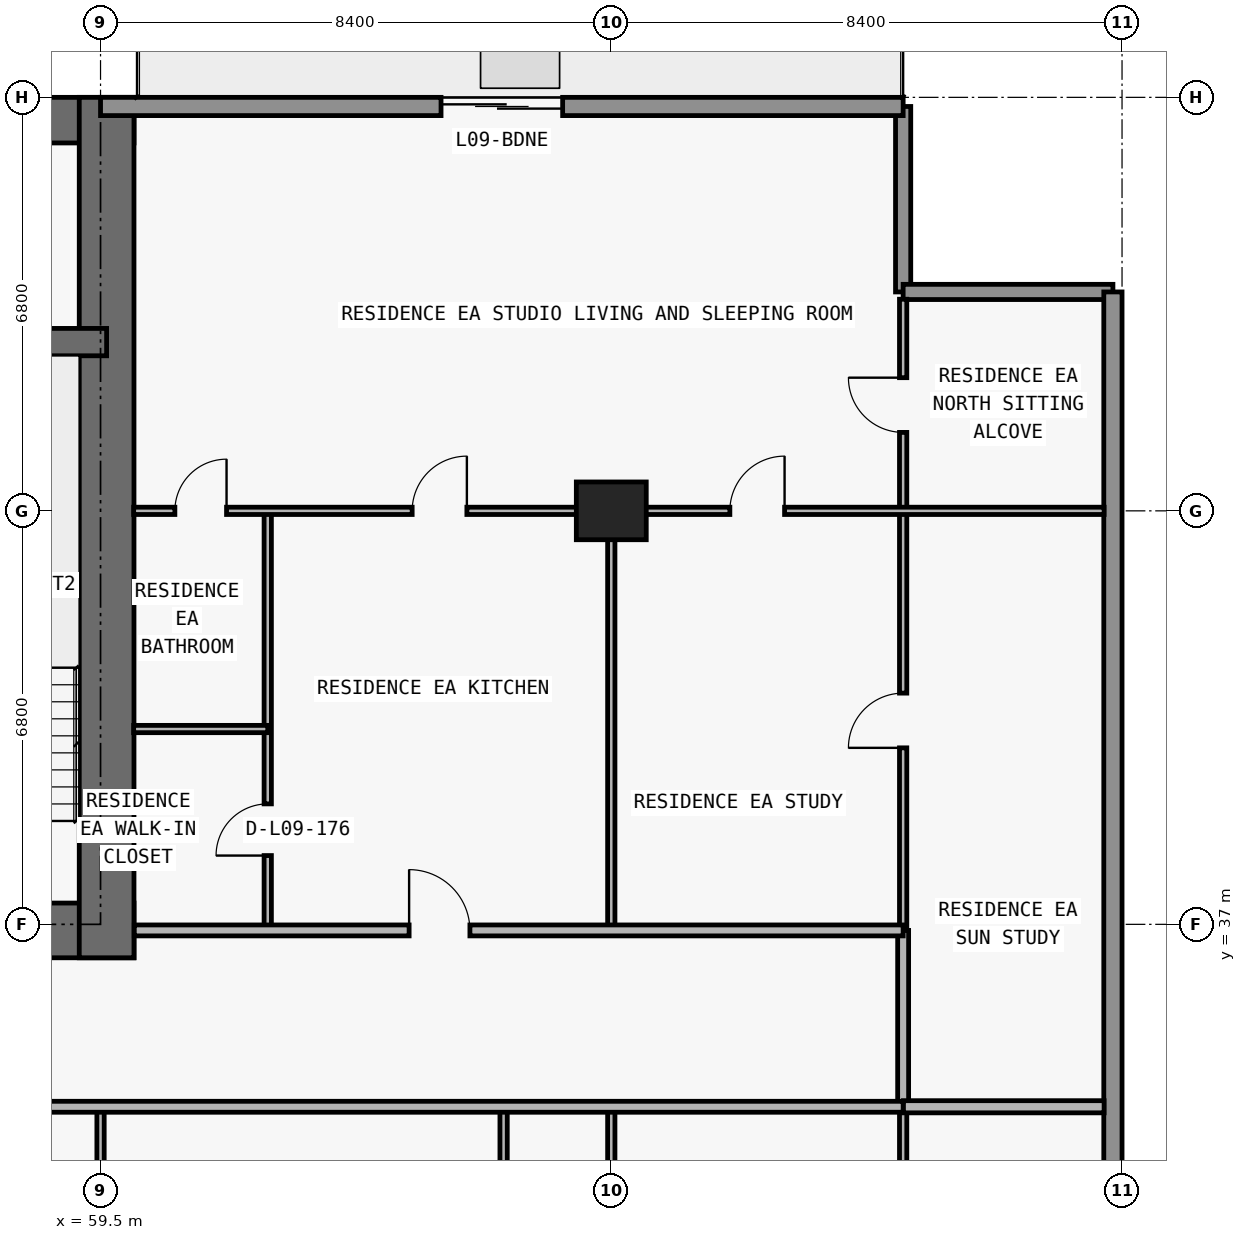
"""IFC4 building model, lengths in metres.
Left out: names, types, materials, properties, quantities, classifications, styles, units other than length and angle.
Written with IfcOpenShell. Run it as: python <this file> out.ifc"""

import sys

from ifc_helpers import new_model, si_unit, direction, frame, frame_2d, origin, origin_2d, place, context, subcontext, project, spatial, rectangle, extrude, element, fill, save


model = new_model("IFC4")
c1 = context("Model", 3, precision=1e-05, world=origin(), true_north=direction((0.0, 1.0)))
c2 = subcontext(c1, "Body", "Model", "MODEL_VIEW")
j1 = project(units=[si_unit("LENGTHUNIT", "METRE"), si_unit("PLANEANGLEUNIT", "RADIAN")], contexts=[c1])
p1 = place(None, origin())
s1 = spatial("IfcSite", under=j1, at=p1, CompositionType="ELEMENT")
p2 = place(p1, origin())
s2 = spatial("IfcBuilding", under=s1, at=p2, CompositionType="ELEMENT")
p3 = place(p2, frame((0.0, 0.0, 39.9)))
s3 = spatial("IfcBuildingStorey", under=s2, at=p3, CompositionType="ELEMENT", Elevation=39.9)
p4 = place(p3, frame((67.9, 43.8, 0.0), z_axis=(0.0, 0.0, 1.0), x_axis=(1.0, 0.0, 0.0)))
e1 = element("IfcColumn", 1, at=p4, inside=s3, PredefinedType="COLUMN", context=c2, shape_type="SweptSolid", body=[
    extrude(rectangle(XDim=1.15, YDim=0.95, at=origin_2d()), origin(), (0.0, 0.0, 1.0), 3.05),
])
p5 = place(p3, frame((17.75, 36.9, 0.0), z_axis=(0.0, 0.0, 1.0), x_axis=(1.0, 0.0, 0.0)))
e2 = element("IfcWall", 2, at=p5, inside=s3, PredefinedType="SHEAR", context=c2, shape_type="SweptSolid", body=[
    extrude(rectangle(XDim=42.3, YDim=0.9, at=frame_2d((21.15, 0.0))), origin(), (0.0, 0.0, 1.0), 3.05),
])
p6 = place(p5, frame((14.55, 0.0, 0.0)))
e3 = element("IfcOpeningElement", 3, at=p6, cuts=e2, PredefinedType="OPENING", context=c2, shape_type="SweptSolid", body=[
    extrude(rectangle(XDim=1.1, YDim=2.15, at=frame_2d((0.55, 1.075))), frame((0.0, 0.46, 0.0), z_axis=(0.0, -1.0, 0.0), x_axis=(1.0, 0.0, 0.0)), (0.0, 0.0, 1.0), 0.92),
])
p7 = place(p5, frame((6.4, 0.0, 0.0)))
e4 = element("IfcOpeningElement", 4, at=p7, cuts=e2, PredefinedType="OPENING", context=c2, shape_type="SweptSolid", body=[
    extrude(rectangle(XDim=1.05, YDim=2.15, at=frame_2d((0.525, 1.075))), frame((0.0, 0.46, 0.0), z_axis=(0.0, -1.0, 0.0), x_axis=(1.0, 0.0, 0.0)), (0.0, 0.0, 1.0), 0.92),
])
p8 = place(p5, frame((34.9, 0.0, 0.0)))
e5 = element("IfcOpeningElement", 5, at=p8, cuts=e2, PredefinedType="OPENING", context=c2, shape_type="SweptSolid", body=[
    extrude(rectangle(XDim=1.05, YDim=2.15, at=frame_2d((0.525, 1.075))), frame((0.0, 0.46, 0.0), z_axis=(0.0, -1.0, 0.0), x_axis=(1.0, 0.0, 0.0)), (0.0, 0.0, 1.0), 0.92),
])
p9 = place(p5, frame((11.012, 0.0, 0.0)))
e6 = element("IfcOpeningElement", 6, at=p9, cuts=e2, PredefinedType="OPENING", context=c2, shape_type="SweptSolid", body=[
    extrude(rectangle(XDim=1.05, YDim=2.15, at=frame_2d((0.525, 1.075))), frame((0.0, 0.46, 0.0), z_axis=(0.0, -1.0, 0.0), x_axis=(1.0, 0.0, 0.0)), (0.0, 0.0, 1.0), 0.92),
])
p10 = place(p5, frame((24.25, 0.0, 0.0)))
e7 = element("IfcOpeningElement", 7, at=p10, cuts=e2, PredefinedType="OPENING", context=c2, shape_type="SweptSolid", body=[
    extrude(rectangle(XDim=1.05, YDim=2.15, at=frame_2d((0.525, 1.075))), frame((0.0, 0.46, 0.0), z_axis=(0.0, -1.0, 0.0), x_axis=(1.0, 0.0, 0.0)), (0.0, 0.0, 1.0), 0.92),
])
p11 = place(p3, frame((17.75, 50.225, 0.0), z_axis=(0.0, 0.0, 1.0), x_axis=(1.0, 0.0, 0.0)))
e8 = element("IfcWall", 8, at=p11, inside=s3, PredefinedType="SHEAR", context=c2, shape_type="SweptSolid", body=[
    extrude(rectangle(XDim=42.3, YDim=0.75, at=frame_2d((21.15, 0.0))), origin(), (0.0, 0.0, 1.0), 3.05),
])
p12 = place(p3, frame((59.6, 36.45, 0.0), z_axis=(0.0, 0.0, 1.0), x_axis=(0.0, 1.0, 0.0)))
e9 = element("IfcWall", 9, at=p12, inside=s3, PredefinedType="SHEAR", context=c2, shape_type="SweptSolid", body=[
    extrude(rectangle(XDim=14.15, YDim=0.9, at=frame_2d((7.075, 0.0))), origin(), (0.0, 0.0, 1.0), 3.05),
])
p13 = place(p3, frame((18.2, 46.575, 0.0), z_axis=(0.0, 0.0, 1.0), x_axis=(1.0, 0.0, 0.0)))
e10 = element("IfcWall", 10, at=p13, inside=s3, PredefinedType="SHEAR", context=c2, shape_type="SweptSolid", body=[
    extrude(rectangle(XDim=41.4, YDim=0.45, at=frame_2d((20.7, 0.0))), origin(), (0.0, 0.0, 1.0), 3.05),
])
p14 = place(p13, frame((7.7, 0.0, 0.0)))
e11 = element("IfcOpeningElement", 11, at=p14, cuts=e10, PredefinedType="OPENING", context=c2, shape_type="SweptSolid", body=[
    extrude(rectangle(XDim=1.0, YDim=2.2, at=frame_2d((0.5, 1.1))), frame((0.0, 0.235, 0.0), z_axis=(0.0, -1.0, 0.0), x_axis=(1.0, 0.0, 0.0)), (0.0, 0.0, 1.0), 0.47),
])
p15 = place(p13, frame((32.725, 0.0, 0.0)))
e12 = element("IfcOpeningElement", 12, at=p15, cuts=e10, PredefinedType="OPENING", context=c2, shape_type="SweptSolid", body=[
    extrude(rectangle(XDim=1.05, YDim=2.15, at=frame_2d((0.525, 1.075))), frame((0.0, 0.235, 0.0), z_axis=(0.0, -1.0, 0.0), x_axis=(1.0, 0.0, 0.0)), (0.0, 0.0, 1.0), 0.47),
])
p16 = place(p3, frame((72.7, 50.45, 0.0), z_axis=(0.0, 0.0, 1.0), x_axis=(0.0, -1.0, 0.0)))
e13 = element("IfcWall", 13, at=p16, inside=s3, PredefinedType="ELEMENTEDWALL", context=c2, shape_type="SweptSolid", body=[
    extrude(rectangle(XDim=3.05, YDim=0.25, at=frame_2d((1.525, 0.0))), origin(), (0.0, 0.0, 1.0), 3.05),
])
p17 = place(p3, frame((72.7, 47.4, 0.0), z_axis=(0.0, 0.0, 1.0), x_axis=(1.0, 0.0, 0.0)))
e14 = element("IfcWall", 14, at=p17, inside=s3, PredefinedType="ELEMENTEDWALL", context=c2, shape_type="SweptSolid", body=[
    extrude(rectangle(XDim=3.45, YDim=0.25, at=frame_2d((1.725, 0.0))), origin(), (0.0, 0.0, 1.0), 3.05),
])
p18 = place(p3, frame((76.15, 47.4, 0.0), z_axis=(0.0, 0.0, 1.0), x_axis=(0.0, -1.0, 0.0)))
e15 = element("IfcWall", 15, at=p18, inside=s3, PredefinedType="STANDARD", context=c2, shape_type="SweptSolid", body=[
    extrude(rectangle(XDim=20.6, YDim=0.3, at=frame_2d((10.3, 0.0))), origin(), (0.0, 0.0, 1.0), 3.05),
])
p19 = place(p3, frame((59.5, 50.45, 0.0), z_axis=(0.0, 0.0, 1.0), x_axis=(1.0, 0.0, 0.0)))
e16 = element("IfcWall", 16, at=p19, inside=s3, PredefinedType="STANDARD", context=c2, shape_type="SweptSolid", body=[
    extrude(rectangle(XDim=13.2, YDim=0.3, at=frame_2d((6.6, 0.0))), origin(), (0.0, 0.0, 1.0), 3.05),
])
p20 = place(p19, frame((5.6, 0.0, 0.0)))
e17 = element("IfcOpeningElement", 17, at=p20, cuts=e16, PredefinedType="OPENING", context=c2, shape_type="SweptSolid", body=[
    extrude(rectangle(XDim=2.0, YDim=2.3, at=frame_2d((1.0, 1.15))), frame((0.0, 0.16, 0.0), z_axis=(0.0, -1.0, 0.0), x_axis=(1.0, 0.0, 0.0)), (0.0, 0.0, 1.0), 0.32),
])
p21 = place(p3, frame((59.5, 28.84, 0.0), z_axis=(0.0, 0.0, 1.0), x_axis=(0.0, 1.0, 0.0)))
e18 = element("IfcWall", 18, at=p21, inside=s3, PredefinedType="PARTITIONING", context=c2, shape_type="SweptSolid", body=[
    extrude(rectangle(XDim=5.16, YDim=0.12, at=frame_2d((2.58, 0.0))), origin(), (0.0, 0.0, 1.0), 2.11),
])
p22 = place(p3, frame((62.25, 36.9, 0.0), z_axis=(0.0, 0.0, 1.0), x_axis=(0.0, 1.0, 0.0)))
e19 = element("IfcWall", 19, at=p22, inside=s3, PredefinedType="PARTITIONING", context=c2, shape_type="SweptSolid", body=[
    extrude(rectangle(XDim=6.9, YDim=0.12, at=frame_2d((3.45, 0.0))), origin(), (0.0, 0.0, 1.0), 3.05),
])
p23 = place(p22, frame((1.231, 0.0, 0.0)))
e20 = element("IfcOpeningElement", 20, at=p23, cuts=e19, PredefinedType="OPENING", context=c2, shape_type="SweptSolid", body=[
    extrude(rectangle(XDim=0.85, YDim=2.1, at=frame_2d((0.425, 1.05))), frame((0.0, 0.07, 0.0), z_axis=(0.0, -1.0, 0.0), x_axis=(1.0, 0.0, 0.0)), (0.0, 0.0, 1.0), 0.14),
])
p24 = place(p3, frame((66.129, 28.84, 0.0), z_axis=(0.0, 0.0, 1.0), x_axis=(0.0, 1.0, 0.0)))
e21 = element("IfcWall", 21, at=p24, inside=s3, PredefinedType="PARTITIONING", context=c2, shape_type="SweptSolid", body=[
    extrude(rectangle(XDim=5.16, YDim=0.12, at=frame_2d((2.58, 0.0))), origin(), (0.0, 0.0, 1.0), 3.05),
])
p25 = place(p24, frame((2.155, 0.0, 0.0)))
e22 = element("IfcOpeningElement", 22, at=p25, cuts=e21, PredefinedType="OPENING", context=c2, shape_type="SweptSolid", body=[
    extrude(rectangle(XDim=0.85, YDim=2.1, at=frame_2d((0.425, 1.05))), frame((0.0, 0.07, 0.0), z_axis=(0.0, -1.0, 0.0), x_axis=(1.0, 0.0, 0.0)), (0.0, 0.0, 1.0), 0.14),
])
p26 = place(p3, frame((67.9, 28.84, 0.0), z_axis=(0.0, 0.0, 1.0), x_axis=(0.0, 1.0, 0.0)))
e23 = element("IfcWall", 23, at=p26, inside=s3, PredefinedType="PARTITIONING", context=c2, shape_type="SweptSolid", body=[
    extrude(rectangle(XDim=5.16, YDim=0.12, at=frame_2d((2.58, 0.0))), origin(), (0.0, 0.0, 1.0), 2.11),
])
p27 = place(p3, frame((67.9, 36.9, 0.0), z_axis=(0.0, 0.0, 1.0), x_axis=(0.0, 1.0, 0.0)))
e24 = element("IfcWall", 24, at=p27, inside=s3, PredefinedType="PARTITIONING", context=c2, shape_type="SweptSolid", body=[
    extrude(rectangle(XDim=6.9, YDim=0.12, at=frame_2d((3.45, 0.0))), origin(), (0.0, 0.0, 1.0), 2.11),
])
p28 = place(p3, frame((72.7, 28.84, 0.0), z_axis=(0.0, 0.0, 1.0), x_axis=(0.0, 1.0, 0.0)))
e25 = element("IfcWall", 25, at=p28, inside=s3, PredefinedType="PARTITIONING", context=c2, shape_type="SweptSolid", body=[
    extrude(rectangle(XDim=5.16, YDim=0.12, at=frame_2d((2.58, 0.0))), origin(), (0.0, 0.0, 1.0), 3.05),
])
p29 = place(p3, frame((72.7, 34.005, 0.0), z_axis=(0.0, 0.0, 1.0), x_axis=(0.0, 1.0, 0.0)))
e26 = element("IfcWall", 26, at=p29, inside=s3, PredefinedType="PARTITIONING", context=c2, shape_type="SweptSolid", body=[
    extrude(rectangle(XDim=2.895, YDim=0.18, at=frame_2d((1.448, 0.0))), origin(), (0.0, 0.0, 1.0), 3.05),
])
p30 = place(p3, frame((72.7, 36.905, 0.0), z_axis=(0.0, 0.0, 1.0), x_axis=(0.0, 1.0, 0.0)))
e27 = element("IfcWall", 27, at=p30, inside=s3, PredefinedType="PARTITIONING", context=c2, shape_type="SweptSolid", body=[
    extrude(rectangle(XDim=10.375, YDim=0.12, at=frame_2d((5.188, 0.0))), origin(), (0.0, 0.0, 1.0), 3.05),
])
p31 = place(p30, frame((2.998, 0.0, 0.0)))
e28 = element("IfcOpeningElement", 28, at=p31, cuts=e27, PredefinedType="OPENING", context=c2, shape_type="SweptSolid", body=[
    extrude(rectangle(XDim=0.9, YDim=2.15, at=frame_2d((0.45, 1.075))), frame((0.0, 0.07, 0.0), z_axis=(0.0, -1.0, 0.0), x_axis=(1.0, 0.0, 0.0)), (0.0, 0.0, 1.0), 0.14),
])
p32 = place(p30, frame((8.185, 0.0, 0.0)))
e29 = element("IfcOpeningElement", 29, at=p32, cuts=e27, PredefinedType="OPENING", context=c2, shape_type="SweptSolid", body=[
    extrude(rectangle(XDim=0.9, YDim=2.15, at=frame_2d((0.45, 1.075))), frame((0.0, 0.07, 0.0), z_axis=(0.0, -1.0, 0.0), x_axis=(1.0, 0.0, 0.0)), (0.0, 0.0, 1.0), 0.14),
])
p33 = place(p3, frame((5.105, 34.0, 0.0), z_axis=(0.0, 0.0, 1.0), x_axis=(1.0, 0.0, 0.0)))
e30 = element("IfcWall", 30, at=p33, inside=s3, PredefinedType="PARTITIONING", context=c2, shape_type="SweptSolid", body=[
    extrude(rectangle(XDim=67.595, YDim=0.18, at=frame_2d((33.797, 0.0))), origin(), (0.0, 0.0, 1.0), 3.05),
])
p34 = place(p33, frame((7.504, 0.0, 0.0)))
e31 = element("IfcOpeningElement", 31, at=p34, cuts=e30, PredefinedType="OPENING", context=c2, shape_type="SweptSolid", body=[
    extrude(rectangle(XDim=1.0, YDim=2.2, at=frame_2d((0.5, 1.1))), frame((0.0, 0.1, 0.0), z_axis=(0.0, -1.0, 0.0), x_axis=(1.0, 0.0, 0.0)), (0.0, 0.0, 1.0), 0.2),
])
p35 = place(p33, frame((24.213, 0.0, 0.0)))
e32 = element("IfcOpeningElement", 32, at=p35, cuts=e30, PredefinedType="OPENING", context=c2, shape_type="SweptSolid", body=[
    extrude(rectangle(XDim=1.0, YDim=2.2, at=frame_2d((0.5, 1.1))), frame((0.0, 0.1, 0.0), z_axis=(0.0, -1.0, 0.0), x_axis=(1.0, 0.0, 0.0)), (0.0, 0.0, 1.0), 0.2),
])
p36 = place(p33, frame((32.365, 0.0, 0.0)))
e33 = element("IfcOpeningElement", 33, at=p36, cuts=e30, PredefinedType="OPENING", context=c2, shape_type="SweptSolid", body=[
    extrude(rectangle(XDim=1.0, YDim=2.2, at=frame_2d((0.5, 1.1))), frame((0.0, 0.1, 0.0), z_axis=(0.0, -1.0, 0.0), x_axis=(1.0, 0.0, 0.0)), (0.0, 0.0, 1.0), 0.2),
])
p37 = place(p33, frame((40.24, 0.0, 0.0)))
e34 = element("IfcOpeningElement", 34, at=p37, cuts=e30, PredefinedType="OPENING", context=c2, shape_type="SweptSolid", body=[
    extrude(rectangle(XDim=1.0, YDim=2.2, at=frame_2d((0.5, 1.1))), frame((0.0, 0.1, 0.0), z_axis=(0.0, -1.0, 0.0), x_axis=(1.0, 0.0, 0.0)), (0.0, 0.0, 1.0), 0.2),
])
p38 = place(p33, frame((48.708, 0.0, 0.0)))
e35 = element("IfcOpeningElement", 35, at=p38, cuts=e30, PredefinedType="OPENING", context=c2, shape_type="SweptSolid", body=[
    extrude(rectangle(XDim=1.0, YDim=2.2, at=frame_2d((0.5, 1.1))), frame((0.0, 0.1, 0.0), z_axis=(0.0, -1.0, 0.0), x_axis=(1.0, 0.0, 0.0)), (0.0, 0.0, 1.0), 0.2),
])
p39 = place(p3, frame((72.705, 34.0, 0.0), z_axis=(0.0, 0.0, 1.0), x_axis=(1.0, 0.0, 0.0)))
e36 = element("IfcWall", 36, at=p39, inside=s3, PredefinedType="PARTITIONING", context=c2, shape_type="SweptSolid", body=[
    extrude(rectangle(XDim=3.3, YDim=0.2, at=frame_2d((1.65, 0.0))), origin(), (0.0, 0.0, 1.0), 3.05),
])
p40 = place(p3, frame((60.055, 36.9, 0.0), z_axis=(0.0, 0.0, 1.0), x_axis=(1.0, 0.0, 0.0)))
e37 = element("IfcWall", 37, at=p40, inside=s3, PredefinedType="PARTITIONING", context=c2, shape_type="SweptSolid", body=[
    extrude(rectangle(XDim=12.645, YDim=0.18, at=frame_2d((6.323, 0.0))), origin(), (0.0, 0.0, 1.0), 3.05),
])
p41 = place(p40, frame((4.52, 0.0, 0.0)))
e38 = element("IfcOpeningElement", 38, at=p41, cuts=e37, PredefinedType="OPENING", context=c2, shape_type="SweptSolid", body=[
    extrude(rectangle(XDim=1.0, YDim=2.2, at=frame_2d((0.5, 1.1))), frame((0.0, 0.1, 0.0), z_axis=(0.0, -1.0, 0.0), x_axis=(1.0, 0.0, 0.0)), (0.0, 0.0, 1.0), 0.2),
])
p42 = place(p3, frame((60.045, 40.212, 0.0), z_axis=(0.0, 0.0, 1.0), x_axis=(1.0, 0.0, 0.0)))
e39 = element("IfcWall", 39, at=p42, inside=s3, PredefinedType="PARTITIONING", context=c2, shape_type="SweptSolid", body=[
    extrude(rectangle(XDim=2.205, YDim=0.12, at=frame_2d((1.103, 0.0))), origin(), (0.0, 0.0, 1.0), 3.05),
])
p43 = place(p3, frame((60.045, 43.8, 0.0), z_axis=(0.0, 0.0, 1.0), x_axis=(1.0, 0.0, 0.0)))
e40 = element("IfcWall", 40, at=p43, inside=s3, PredefinedType="PARTITIONING", context=c2, shape_type="SweptSolid", body=[
    extrude(rectangle(XDim=15.96, YDim=0.12, at=frame_2d((7.98, 0.0))), origin(), (0.0, 0.0, 1.0), 2.339),
])
p44 = place(p43, frame((9.805, 0.0, 0.0)))
e41 = element("IfcOpeningElement", 41, at=p44, cuts=e40, PredefinedType="OPENING", context=c2, shape_type="SweptSolid", body=[
    extrude(rectangle(XDim=0.9, YDim=2.15, at=frame_2d((0.45, 1.075))), frame((0.0, 0.07, 0.0), z_axis=(0.0, -1.0, 0.0), x_axis=(1.0, 0.0, 0.0)), (0.0, 0.0, 1.0), 0.14),
])
p45 = place(p43, frame((4.58, 0.0, 0.0)))
e42 = element("IfcOpeningElement", 42, at=p45, cuts=e40, PredefinedType="OPENING", context=c2, shape_type="SweptSolid", body=[
    extrude(rectangle(XDim=0.9, YDim=2.15, at=frame_2d((0.45, 1.075))), frame((0.0, 0.07, 0.0), z_axis=(0.0, -1.0, 0.0), x_axis=(1.0, 0.0, 0.0)), (0.0, 0.0, 1.0), 0.14),
])
p46 = place(p43, frame((0.677, 0.0, 0.0)))
e43 = element("IfcOpeningElement", 43, at=p46, cuts=e40, PredefinedType="OPENING", context=c2, shape_type="SweptSolid", body=[
    extrude(rectangle(XDim=0.85, YDim=2.1, at=frame_2d((0.425, 1.05))), frame((0.0, 0.07, 0.0), z_axis=(0.0, -1.0, 0.0), x_axis=(1.0, 0.0, 0.0)), (0.0, 0.0, 1.0), 0.14),
])
p47 = place(p20, origin())
e44 = element("IfcDoor", 44, at=p47, inside=s3, OperationType="DOUBLE_DOOR_SLIDING", PredefinedType="DOOR", context=c2, shape_type="SweptSolid", body=[
    extrude(rectangle(XDim=2.0, YDim=2.3, at=frame_2d((1.0, 1.15))), frame((0.0, 0.025, 0.0), z_axis=(0.0, -1.0, 0.0), x_axis=(1.0, 0.0, 0.0)), (0.0, 0.0, 1.0), 0.05),
])
fill(e17, e44)
p48 = place(p44, origin())
e45 = element("IfcDoor", 45, at=p48, inside=s3, OperationType="SINGLE_SWING_RIGHT", PredefinedType="DOOR", context=c2, shape_type="SweptSolid", body=[
    extrude(rectangle(XDim=0.9, YDim=2.15, at=frame_2d((0.45, 1.075))), frame((0.0, 0.025, 0.0), z_axis=(0.0, -1.0, 0.0), x_axis=(1.0, 0.0, 0.0)), (0.0, 0.0, 1.0), 0.05),
])
fill(e41, e45)
p49 = place(p41, origin())
e46 = element("IfcDoor", 46, at=p49, inside=s3, OperationType="SINGLE_SWING_LEFT", PredefinedType="DOOR", context=c2, shape_type="SweptSolid", body=[
    extrude(rectangle(XDim=1.0, YDim=2.2, at=frame_2d((0.5, 1.1))), frame((0.0, 0.025, 0.0), z_axis=(0.0, -1.0, 0.0), x_axis=(1.0, 0.0, 0.0)), (0.0, 0.0, 1.0), 0.05),
])
fill(e38, e46)
p50 = place(p45, origin())
e47 = element("IfcDoor", 47, at=p50, inside=s3, OperationType="SINGLE_SWING_RIGHT", PredefinedType="DOOR", context=c2, shape_type="SweptSolid", body=[
    extrude(rectangle(XDim=0.9, YDim=2.15, at=frame_2d((0.45, 1.075))), frame((0.0, 0.025, 0.0), z_axis=(0.0, -1.0, 0.0), x_axis=(1.0, 0.0, 0.0)), (0.0, 0.0, 1.0), 0.05),
])
fill(e42, e47)
p51 = place(p23, origin())
e48 = element("IfcDoor", 48, at=p51, inside=s3, OperationType="SINGLE_SWING_LEFT", PredefinedType="DOOR", context=c2, shape_type="SweptSolid", body=[
    extrude(rectangle(XDim=0.85, YDim=2.1, at=frame_2d((0.425, 1.05))), frame((0.0, 0.025, 0.0), z_axis=(0.0, -1.0, 0.0), x_axis=(1.0, 0.0, 0.0)), (0.0, 0.0, 1.0), 0.05),
])
fill(e20, e48)
p52 = place(p46, origin())
e49 = element("IfcDoor", 49, at=p52, inside=s3, OperationType="SINGLE_SWING_RIGHT", PredefinedType="DOOR", context=c2, shape_type="SweptSolid", body=[
    extrude(rectangle(XDim=0.85, YDim=2.1, at=frame_2d((0.425, 1.05))), frame((0.0, 0.025, 0.0), z_axis=(0.0, -1.0, 0.0), x_axis=(1.0, 0.0, 0.0)), (0.0, 0.0, 1.0), 0.05),
])
fill(e43, e49)
p53 = place(p31, origin())
e50 = element("IfcDoor", 50, at=p53, inside=s3, OperationType="SINGLE_SWING_LEFT", PredefinedType="DOOR", context=c2, shape_type="SweptSolid", body=[
    extrude(rectangle(XDim=0.9, YDim=2.15, at=frame_2d((0.45, 1.075))), frame((0.0, 0.025, 0.0), z_axis=(0.0, -1.0, 0.0), x_axis=(1.0, 0.0, 0.0)), (0.0, 0.0, 1.0), 0.05),
])
fill(e28, e50)
p54 = place(p32, origin())
e51 = element("IfcDoor", 51, at=p54, inside=s3, OperationType="SINGLE_SWING_RIGHT", PredefinedType="DOOR", context=c2, shape_type="SweptSolid", body=[
    extrude(rectangle(XDim=0.9, YDim=2.15, at=frame_2d((0.45, 1.075))), frame((0.0, 0.025, 0.0), z_axis=(0.0, -1.0, 0.0), x_axis=(1.0, 0.0, 0.0)), (0.0, 0.0, 1.0), 0.05),
])
fill(e29, e51)
save(model, sys.argv[1])
